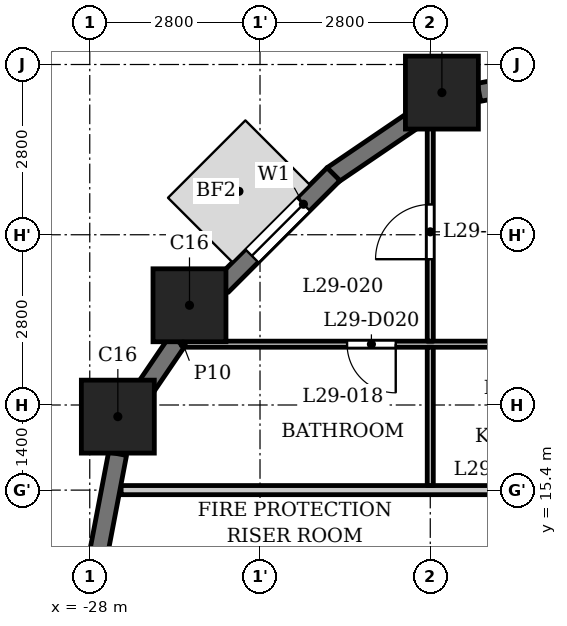
"""IFC4 building model, lengths in metres.
Left out: names, types, materials, properties, quantities, classifications, styles, units other than length and angle.
Written with IfcOpenShell. Run it as: python <this file> out.ifc"""

import sys

from ifc_helpers import new_model, si_unit, direction, frame, frame_2d, origin, origin_2d, place, context, subcontext, project, spatial, rectangle, extrude, element, fill, save


model = new_model("IFC4")
c1 = context("Model", 3, precision=1e-05, world=origin(), true_north=direction((0.0, 1.0)))
c2 = subcontext(c1, "Body", "Model", "MODEL_VIEW")
j1 = project(units=[si_unit("LENGTHUNIT", "METRE"), si_unit("PLANEANGLEUNIT", "RADIAN")], contexts=[c1])
p1 = place(None, origin())
s1 = spatial("IfcSite", under=j1, at=p1, CompositionType="ELEMENT")
p2 = place(p1, origin())
s2 = spatial("IfcBuilding", under=s1, at=p2, CompositionType="ELEMENT")
p3 = place(p2, frame((0.0, 0.0, 114.8)))
s3 = spatial("IfcBuildingStorey", under=s2, at=p3, CompositionType="ELEMENT", Elevation=114.8)
for number, where, z_axis, x_axis in (
    (1, (-22.209, 21.938, 0.0), (0.0, 0.0, 1.0), (1.0, 0.0, 0.0)),
    (2, (-26.36, 18.44, 0.0), (0.0, 0.0, 1.0), (1.0, 0.0, 0.0)),
    (3, (-27.538, 16.609, 0.0), (0.0, 0.0, 1.0), (1.0, 0.0, 0.0)),
):
    element("IfcColumn", number, at=place(p3, frame(where, z_axis=z_axis, x_axis=x_axis)), inside=s3, PredefinedType="COLUMN", context=c2, shape_type="SweptSolid", body=[
        extrude(rectangle(XDim=1.2, YDim=1.2, at=origin_2d()), origin(), (0.0, 0.0, 1.0), 3.5),
    ])
for number, where, z_axis, x_axis in (
    (4, (-19.972, 22.253, 0.0), (0.0, 0.0, 1.0), (-0.982, -0.187, 0.0)),
    (5, (-22.643, 21.51, 0.0), (0.0, 0.0, 1.0), (-0.827, -0.562, 0.0)),
):
    element("IfcWall", number, at=place(p3, frame(where, z_axis=z_axis, x_axis=x_axis)), inside=s3, PredefinedType="SOLIDWALL", context=c2, shape_type="SweptSolid", body=[
        extrude(rectangle(XDim=1.656, YDim=0.3, at=frame_2d((0.828, 0.0))), origin(), (0.0, 0.0, 1.0), 2.4),
    ])
p4 = place(p3, frame((-23.991, 20.597, 0.0), z_axis=(0.0, 0.0, 1.0), x_axis=(-0.707106781187, -0.707106781187, 0.0)))
e6 = element("IfcWall", 6, at=p4, inside=s3, PredefinedType="SOLIDWALL", context=c2, shape_type="SweptSolid", body=[
    extrude(rectangle(XDim=2.6, YDim=0.3, at=frame_2d((1.3, 0.0))), origin(), (0.0, 0.0, 1.0), 2.4),
])
p5 = place(p4, frame((0.7, 0.0, 0.6)))
e7 = element("IfcOpeningElement", 7, at=p5, cuts=e6, PredefinedType="OPENING", context=c2, shape_type="SweptSolid", body=[
    extrude(rectangle(XDim=1.2, YDim=1.55, at=frame_2d((0.6, 0.775))), frame((0.0, 0.16, 0.0), z_axis=(0.0, -1.0, 0.0), x_axis=(1.0, 0.0, 0.0)), (0.0, 0.0, 1.0), 0.32),
])
p6 = place(p3, frame((-26.561, 17.851, 0.0), z_axis=(0.0, 0.0, 1.0), x_axis=(-0.562173331661, -0.827019434577, 0.0)))
e8 = element("IfcWall", 8, at=p6, inside=s3, PredefinedType="SOLIDWALL", context=c2, shape_type="SweptSolid", body=[
    extrude(rectangle(XDim=0.977, YDim=0.3, at=frame_2d((0.489, 0.0))), origin(), (0.0, 0.0, 1.0), 3.2),
])
p7 = place(p3, frame((-27.542, 15.999, 0.0), z_axis=(0.0, 0.0, 1.0), x_axis=(-0.187349172861, -0.982293381546, 0.0)))
e9 = element("IfcWall", 9, at=p7, inside=s3, PredefinedType="SOLIDWALL", context=c2, shape_type="SweptSolid", body=[
    extrude(rectangle(XDim=1.656, YDim=0.3, at=frame_2d((0.828, 0.0))), origin(), (0.0, 0.0, 1.0), 2.4),
])
p8 = place(p3, frame((-27.484, 15.4, 0.0), z_axis=(0.0, 0.0, 1.0), x_axis=(1.0, 0.0, 0.0)))
e10 = element("IfcWall", 10, at=p8, inside=s3, PredefinedType="PARTITIONING", context=c2, shape_type="SweptSolid", body=[
    extrude(rectangle(XDim=54.968, YDim=0.15, at=frame_2d((27.484, 0.0))), origin(), (0.0, 0.0, 1.0), 3.2),
])
p9 = place(p8, frame((9.034, 0.0, 0.0)))
e11 = element("IfcOpeningElement", 11, at=p9, cuts=e10, PredefinedType="OPENING", context=c2, shape_type="SweptSolid", body=[
    extrude(rectangle(XDim=1.0, YDim=2.1, at=frame_2d((0.5, 1.05))), frame((0.0, 0.085, 0.0), z_axis=(0.0, -1.0, 0.0), x_axis=(1.0, 0.0, 0.0)), (0.0, 0.0, 1.0), 0.17),
])
p10 = place(p8, frame((14.634, 0.0, 0.0)))
e12 = element("IfcOpeningElement", 12, at=p10, cuts=e10, PredefinedType="OPENING", context=c2, shape_type="SweptSolid", body=[
    extrude(rectangle(XDim=1.0, YDim=2.1, at=frame_2d((0.5, 1.05))), frame((0.0, 0.085, 0.0), z_axis=(0.0, -1.0, 0.0), x_axis=(1.0, 0.0, 0.0)), (0.0, 0.0, 1.0), 0.17),
])
p11 = place(p8, frame((16.984, 0.0, 0.0)))
e13 = element("IfcOpeningElement", 13, at=p11, cuts=e10, PredefinedType="OPENING", context=c2, shape_type="SweptSolid", body=[
    extrude(rectangle(XDim=1.0, YDim=2.1, at=frame_2d((0.5, 1.05))), frame((0.0, 0.085, 0.0), z_axis=(0.0, -1.0, 0.0), x_axis=(1.0, 0.0, 0.0)), (0.0, 0.0, 1.0), 0.17),
])
p12 = place(p8, frame((28.084, 0.0, 0.0)))
e14 = element("IfcOpeningElement", 14, at=p12, cuts=e10, PredefinedType="OPENING", context=c2, shape_type="SweptSolid", body=[
    extrude(rectangle(XDim=1.0, YDim=2.1, at=frame_2d((0.5, 1.05))), frame((0.0, 0.085, 0.0), z_axis=(0.0, -1.0, 0.0), x_axis=(1.0, 0.0, 0.0)), (0.0, 0.0, 1.0), 0.17),
])
p13 = place(p8, frame((34.834, 0.0, 0.0)))
e15 = element("IfcOpeningElement", 15, at=p13, cuts=e10, PredefinedType="OPENING", context=c2, shape_type="SweptSolid", body=[
    extrude(rectangle(XDim=1.0, YDim=2.1, at=frame_2d((0.5, 1.05))), frame((0.0, 0.085, 0.0), z_axis=(0.0, -1.0, 0.0), x_axis=(1.0, 0.0, 0.0)), (0.0, 0.0, 1.0), 0.17),
])
p14 = place(p8, frame((41.884, 0.0, 0.0)))
e16 = element("IfcOpeningElement", 16, at=p14, cuts=e10, PredefinedType="OPENING", context=c2, shape_type="SweptSolid", body=[
    extrude(rectangle(XDim=1.0, YDim=2.1, at=frame_2d((0.5, 1.05))), frame((0.0, 0.085, 0.0), z_axis=(0.0, -1.0, 0.0), x_axis=(1.0, 0.0, 0.0)), (0.0, 0.0, 1.0), 0.17),
])
p15 = place(p8, frame((48.234, 0.0, 0.0)))
e17 = element("IfcOpeningElement", 17, at=p15, cuts=e10, PredefinedType="OPENING", context=c2, shape_type="SweptSolid", body=[
    extrude(rectangle(XDim=1.0, YDim=2.1, at=frame_2d((0.5, 1.05))), frame((0.0, 0.085, 0.0), z_axis=(0.0, -1.0, 0.0), x_axis=(1.0, 0.0, 0.0)), (0.0, 0.0, 1.0), 0.17),
])
p16 = place(p3, frame((-26.465, 17.8, 0.0), z_axis=(0.0, 0.0, 1.0), x_axis=(1.0, 0.0, 0.0)))
e18 = element("IfcWall", 18, at=p16, inside=s3, PredefinedType="PARTITIONING", context=c2, shape_type="SweptSolid", body=[
    extrude(rectangle(XDim=52.859, YDim=0.1, at=frame_2d((26.43, 0.0))), origin(), (0.0, 0.0, 1.0), 3.2),
])
p17 = place(p16, frame((2.697, 0.0, 0.0)))
e19 = element("IfcOpeningElement", 19, at=p17, cuts=e18, PredefinedType="OPENING", context=c2, shape_type="SweptSolid", body=[
    extrude(rectangle(XDim=0.8, YDim=2.1, at=frame_2d((0.4, 1.05))), frame((0.0, 0.06, 0.0), z_axis=(0.0, -1.0, 0.0), x_axis=(1.0, 0.0, 0.0)), (0.0, 0.0, 1.0), 0.12),
])
p18 = place(p16, frame((7.115, 0.0, 0.0)))
e20 = element("IfcOpeningElement", 20, at=p18, cuts=e18, PredefinedType="OPENING", context=c2, shape_type="SweptSolid", body=[
    extrude(rectangle(XDim=0.9, YDim=2.1, at=frame_2d((0.45, 1.05))), frame((0.0, 0.06, 0.0), z_axis=(0.0, -1.0, 0.0), x_axis=(1.0, 0.0, 0.0)), (0.0, 0.0, 1.0), 0.12),
])
p19 = place(p16, frame((10.315, 0.0, 0.0)))
e21 = element("IfcOpeningElement", 21, at=p19, cuts=e18, PredefinedType="OPENING", context=c2, shape_type="SweptSolid", body=[
    extrude(rectangle(XDim=0.8, YDim=2.1, at=frame_2d((0.4, 1.05))), frame((0.0, 0.06, 0.0), z_axis=(0.0, -1.0, 0.0), x_axis=(1.0, 0.0, 0.0)), (0.0, 0.0, 1.0), 0.12),
])
p20 = place(p16, frame((12.715, 0.0, 0.0)))
e22 = element("IfcOpeningElement", 22, at=p20, cuts=e18, PredefinedType="OPENING", context=c2, shape_type="SweptSolid", body=[
    extrude(rectangle(XDim=0.9, YDim=2.1, at=frame_2d((0.45, 1.05))), frame((0.0, 0.06, 0.0), z_axis=(0.0, -1.0, 0.0), x_axis=(1.0, 0.0, 0.0)), (0.0, 0.0, 1.0), 0.12),
])
p21 = place(p16, frame((21.515, 0.0, 0.0)))
e23 = element("IfcOpeningElement", 23, at=p21, cuts=e18, PredefinedType="OPENING", context=c2, shape_type="SweptSolid", body=[
    extrude(rectangle(XDim=0.8, YDim=2.1, at=frame_2d((0.4, 1.05))), frame((0.0, 0.06, 0.0), z_axis=(0.0, -1.0, 0.0), x_axis=(1.0, 0.0, 0.0)), (0.0, 0.0, 1.0), 0.12),
])
p22 = place(p16, frame((17.065, 0.0, 0.0)))
e24 = element("IfcOpeningElement", 24, at=p22, cuts=e18, PredefinedType="OPENING", context=c2, shape_type="SweptSolid", body=[
    extrude(rectangle(XDim=0.9, YDim=2.1, at=frame_2d((0.45, 1.05))), frame((0.0, 0.06, 0.0), z_axis=(0.0, -1.0, 0.0), x_axis=(1.0, 0.0, 0.0)), (0.0, 0.0, 1.0), 0.12),
])
p23 = place(p16, frame((30.365, 0.0, 0.0)))
e25 = element("IfcOpeningElement", 25, at=p23, cuts=e18, PredefinedType="OPENING", context=c2, shape_type="SweptSolid", body=[
    extrude(rectangle(XDim=0.8, YDim=2.1, at=frame_2d((0.4, 1.05))), frame((0.0, 0.06, 0.0), z_axis=(0.0, -1.0, 0.0), x_axis=(1.0, 0.0, 0.0)), (0.0, 0.0, 1.0), 0.12),
])
p24 = place(p16, frame((28.165, 0.0, 0.0)))
e26 = element("IfcOpeningElement", 26, at=p24, cuts=e18, PredefinedType="OPENING", context=c2, shape_type="SweptSolid", body=[
    extrude(rectangle(XDim=0.9, YDim=2.1, at=frame_2d((0.45, 1.05))), frame((0.0, 0.06, 0.0), z_axis=(0.0, -1.0, 0.0), x_axis=(1.0, 0.0, 0.0)), (0.0, 0.0, 1.0), 0.12),
])
p25 = place(p16, frame((36.115, 0.0, 0.0)))
e27 = element("IfcOpeningElement", 27, at=p25, cuts=e18, PredefinedType="OPENING", context=c2, shape_type="SweptSolid", body=[
    extrude(rectangle(XDim=0.8, YDim=2.1, at=frame_2d((0.4, 1.05))), frame((0.0, 0.06, 0.0), z_axis=(0.0, -1.0, 0.0), x_axis=(1.0, 0.0, 0.0)), (0.0, 0.0, 1.0), 0.12),
])
p26 = place(p16, frame((32.915, 0.0, 0.0)))
e28 = element("IfcOpeningElement", 28, at=p26, cuts=e18, PredefinedType="OPENING", context=c2, shape_type="SweptSolid", body=[
    extrude(rectangle(XDim=0.9, YDim=2.1, at=frame_2d((0.45, 1.05))), frame((0.0, 0.06, 0.0), z_axis=(0.0, -1.0, 0.0), x_axis=(1.0, 0.0, 0.0)), (0.0, 0.0, 1.0), 0.12),
])
p27 = place(p16, frame((38.315, 0.0, 0.0)))
e29 = element("IfcOpeningElement", 29, at=p27, cuts=e18, PredefinedType="OPENING", context=c2, shape_type="SweptSolid", body=[
    extrude(rectangle(XDim=0.8, YDim=2.1, at=frame_2d((0.4, 1.05))), frame((0.0, 0.06, 0.0), z_axis=(0.0, -1.0, 0.0), x_axis=(1.0, 0.0, 0.0)), (0.0, 0.0, 1.0), 0.12),
])
p28 = place(p16, frame((40.965, 0.0, 0.0)))
e30 = element("IfcOpeningElement", 30, at=p28, cuts=e18, PredefinedType="OPENING", context=c2, shape_type="SweptSolid", body=[
    extrude(rectangle(XDim=0.9, YDim=2.1, at=frame_2d((0.45, 1.05))), frame((0.0, 0.06, 0.0), z_axis=(0.0, -1.0, 0.0), x_axis=(1.0, 0.0, 0.0)), (0.0, 0.0, 1.0), 0.12),
])
p29 = place(p16, frame((51.265, 0.0, 0.0)))
e31 = element("IfcOpeningElement", 31, at=p29, cuts=e18, PredefinedType="OPENING", context=c2, shape_type="SweptSolid", body=[
    extrude(rectangle(XDim=0.8, YDim=2.1, at=frame_2d((0.4, 1.05))), frame((0.0, 0.06, 0.0), z_axis=(0.0, -1.0, 0.0), x_axis=(1.0, 0.0, 0.0)), (0.0, 0.0, 1.0), 0.12),
])
p30 = place(p16, frame((46.315, 0.0, 0.0)))
e32 = element("IfcOpeningElement", 32, at=p30, cuts=e18, PredefinedType="OPENING", context=c2, shape_type="SweptSolid", body=[
    extrude(rectangle(XDim=0.9, YDim=2.1, at=frame_2d((0.45, 1.05))), frame((0.0, 0.06, 0.0), z_axis=(0.0, -1.0, 0.0), x_axis=(1.0, 0.0, 0.0)), (0.0, 0.0, 1.0), 0.12),
])
p31 = place(p3, frame((-22.4, 15.475, 0.0), z_axis=(0.0, 0.0, 1.0), x_axis=(0.0, 1.0, 0.0)))
e33 = element("IfcWall", 33, at=p31, inside=s3, PredefinedType="PARTITIONING", context=c2, shape_type="SweptSolid", body=[
    extrude(rectangle(XDim=2.275, YDim=0.1, at=frame_2d((1.137, 0.0))), origin(), (0.0, 0.0, 1.0), 3.2),
])
p32 = place(p3, frame((-22.4, 17.85, 0.0), z_axis=(0.0, 0.0, 1.0), x_axis=(0.0, 1.0, 0.0)))
e34 = element("IfcWall", 34, at=p32, inside=s3, PredefinedType="PARTITIONING", context=c2, shape_type="SweptSolid", body=[
    extrude(rectangle(XDim=3.87, YDim=0.1, at=frame_2d((1.935, 0.0))), origin(), (0.0, 0.0, 1.0), 3.2),
])
p33 = place(p32, frame((1.348, 0.0, 0.0)))
e35 = element("IfcOpeningElement", 35, at=p33, cuts=e34, PredefinedType="OPENING", context=c2, shape_type="SweptSolid", body=[
    extrude(rectangle(XDim=0.9, YDim=2.1, at=frame_2d((0.45, 1.05))), frame((0.0, 0.06, 0.0), z_axis=(0.0, -1.0, 0.0), x_axis=(1.0, 0.0, 0.0)), (0.0, 0.0, 1.0), 0.12),
])
p34 = place(p17, origin())
e36 = element("IfcDoor", 36, at=p34, inside=s3, OperationType="SINGLE_SWING_RIGHT", PredefinedType="DOOR", context=c2, shape_type="SweptSolid", body=[
    extrude(rectangle(XDim=0.8, YDim=2.1, at=frame_2d((0.4, 1.05))), frame((0.0, 0.025, 0.0), z_axis=(0.0, -1.0, 0.0), x_axis=(1.0, 0.0, 0.0)), (0.0, 0.0, 1.0), 0.05),
])
fill(e19, e36)
p35 = place(p33, origin())
e37 = element("IfcDoor", 37, at=p35, inside=s3, OperationType="SINGLE_SWING_RIGHT", PredefinedType="DOOR", context=c2, shape_type="SweptSolid", body=[
    extrude(rectangle(XDim=0.9, YDim=2.1, at=frame_2d((0.45, 1.05))), frame((0.0, 0.025, 0.0), z_axis=(0.0, -1.0, 0.0), x_axis=(1.0, 0.0, 0.0)), (0.0, 0.0, 1.0), 0.05),
])
fill(e35, e37)
p36 = place(p5, origin())
e38 = element("IfcWindow", 38, at=p36, inside=s3, PartitioningType="SINGLE_PANEL", PredefinedType="WINDOW", context=c2, shape_type="SweptSolid", body=[
    extrude(rectangle(XDim=1.2, YDim=1.55, at=frame_2d((0.6, 0.775))), frame((0.0, 0.03, 0.0), z_axis=(0.0, -1.0, 0.0), x_axis=(1.0, 0.0, 0.0)), (0.0, 0.0, 1.0), 0.06),
])
fill(e7, e38)
save(model, sys.argv[1])
